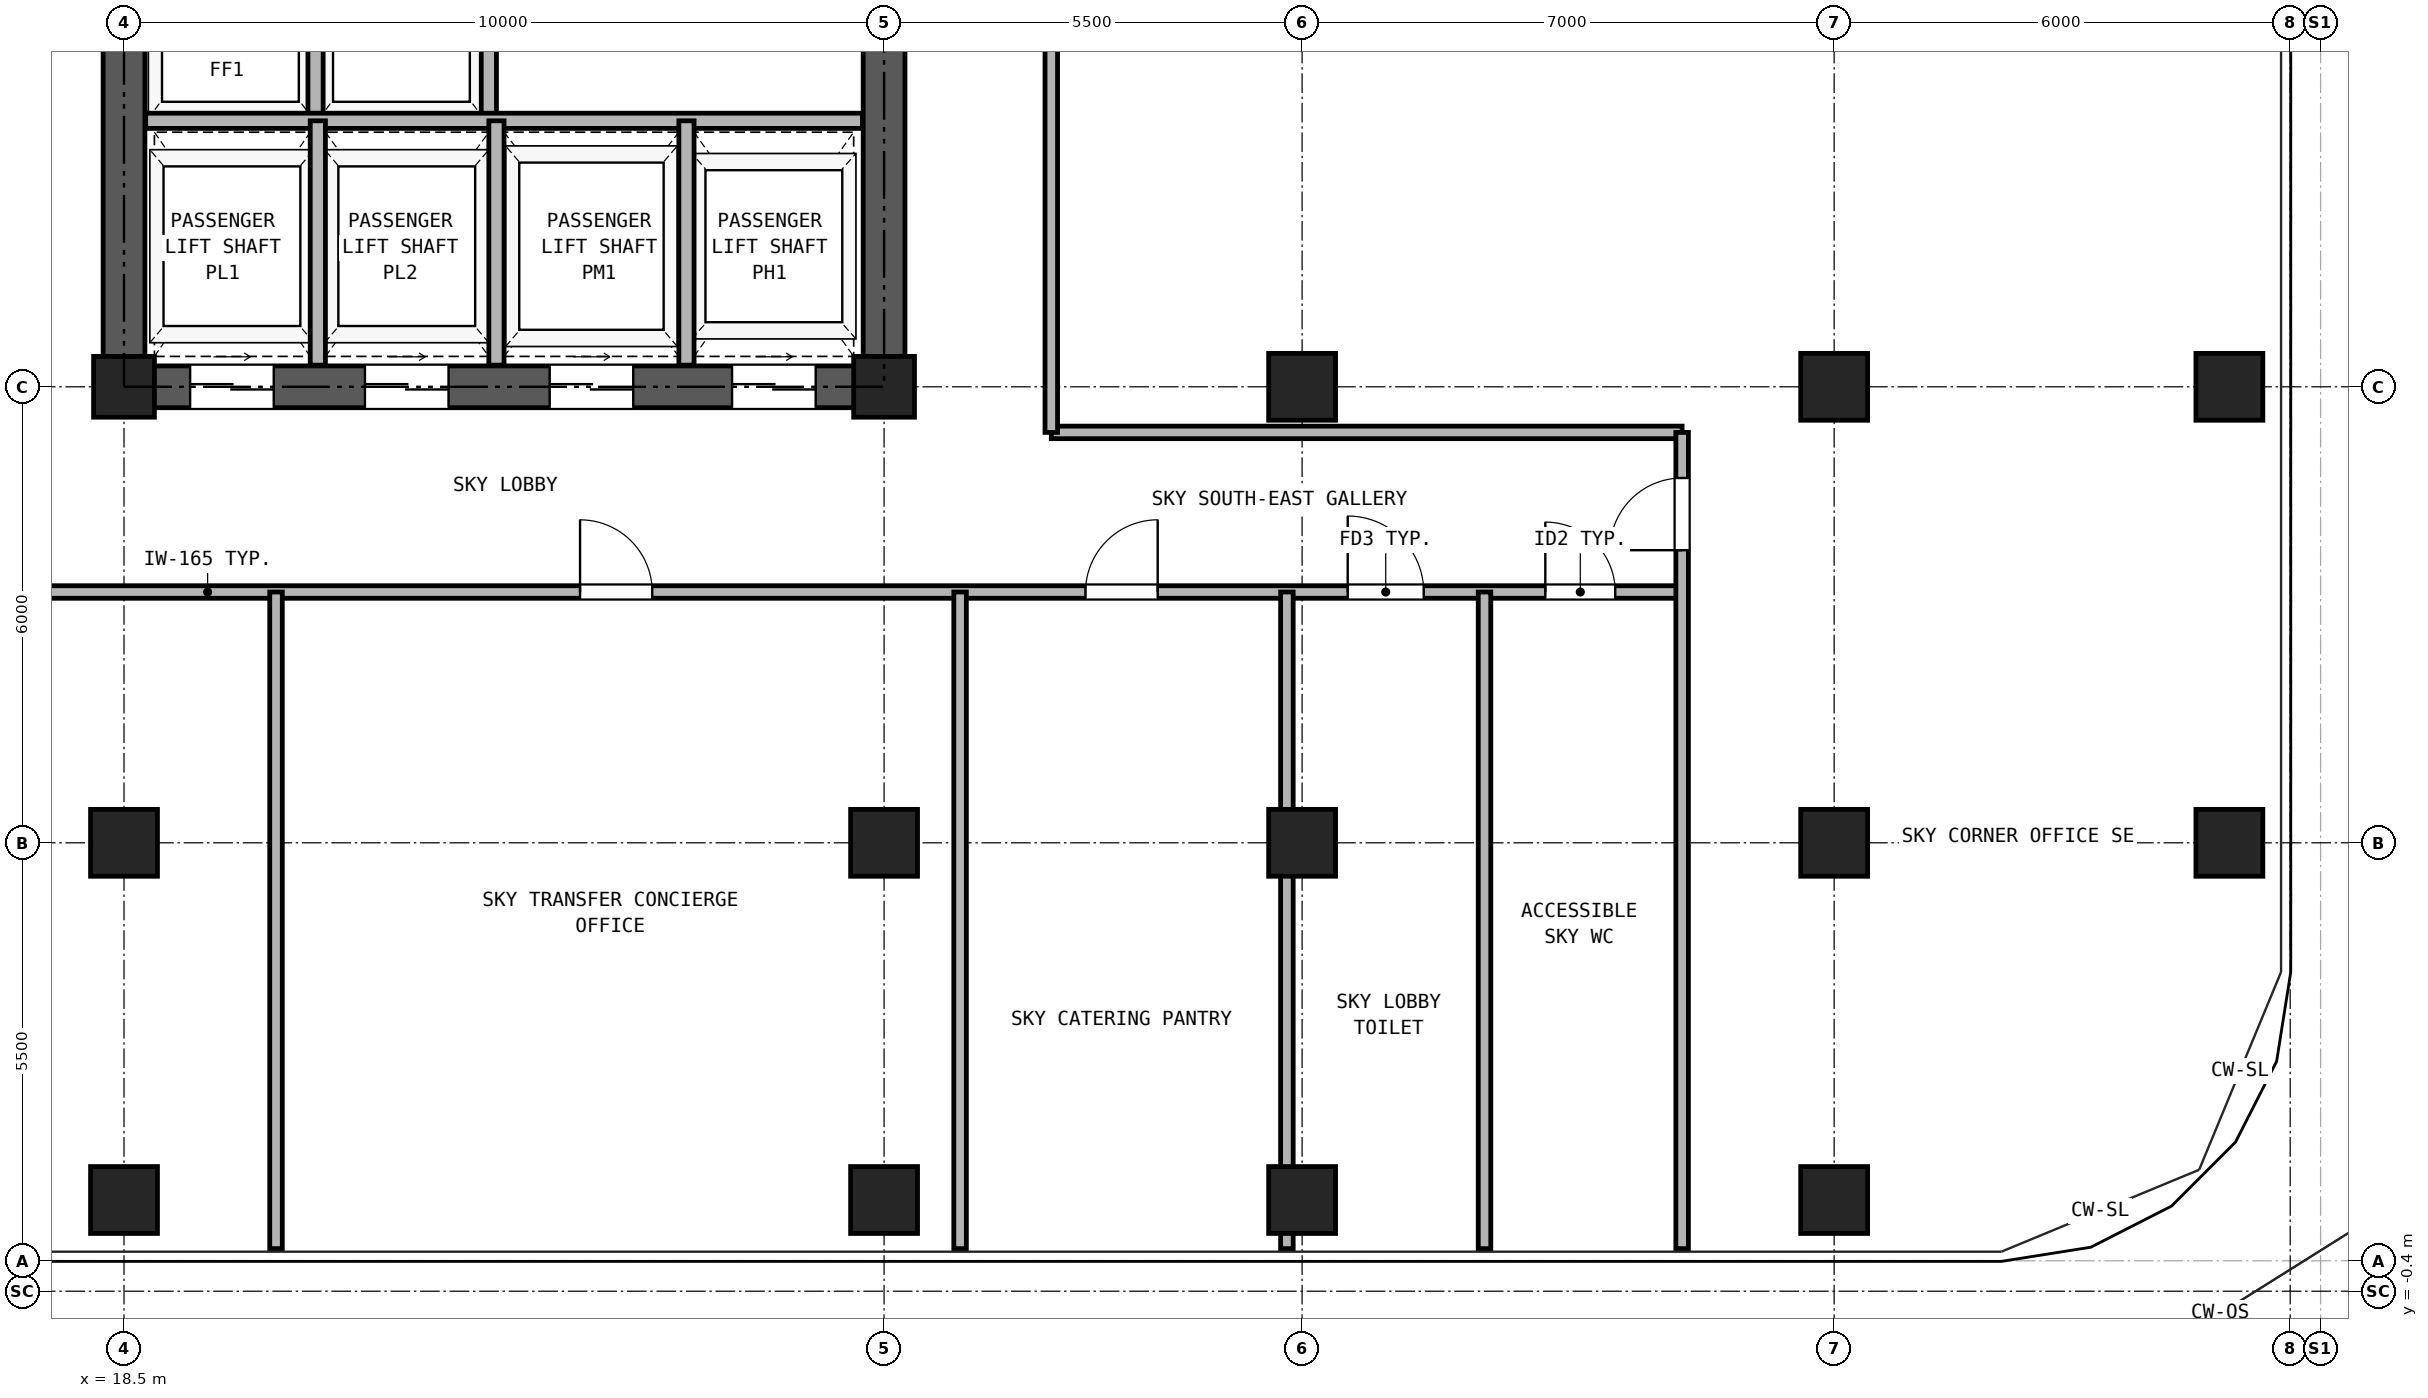
"""IFC4 building model, lengths in metres.
Left out: names, types, materials, properties, quantities, classifications, styles, units other than length and angle.
Written with IfcOpenShell. Run it as: python <this file> out.ifc"""

import sys

from ifc_helpers import new_model, si_unit, direction, frame, frame_2d, origin, origin_2d, place, context, subcontext, project, spatial, rectangle, hollow_rectangle, extrude, source, transform, mapped, element, fill, save


model = new_model("IFC4")
c1 = context("Model", 3, precision=1e-05, world=origin(), true_north=direction((0.0, 1.0)))
c2 = subcontext(c1, "Body", "Model", "MODEL_VIEW")
j1 = project(units=[si_unit("LENGTHUNIT", "METRE"), si_unit("PLANEANGLEUNIT", "RADIAN")], contexts=[c1])
p1 = place(None, origin())
s1 = spatial("IfcSite", under=j1, at=p1, CompositionType="ELEMENT")
p2 = place(p1, origin())
s2 = spatial("IfcBuilding", under=s1, at=p2, CompositionType="ELEMENT")
p3 = place(p2, frame((0.0, 0.0, 88.2)))
s3 = spatial("IfcBuildingStorey", under=s2, at=p3, CompositionType="ELEMENT", Elevation=88.2)
m1 = source(origin(), c2, "Body", "SweptSolid", [
    extrude(hollow_rectangle(XDim=0.88, YDim=0.88, WallThickness=0.05, at=origin_2d()), origin(), (0.0, 0.0, 1.0), 4.25),
])
for number, where, z_axis, x_axis in (
    (1, (18.5, 0.8, 0.0), (0.0, 0.0, 1.0), (1.0, 0.0, 0.0)),
    (2, (28.5, 0.8, 0.0), (0.0, 0.0, 1.0), (1.0, 0.0, 0.0)),
    (3, (34.0, 0.8, 0.0), (0.0, 0.0, 1.0), (1.0, 0.0, 0.0)),
    (4, (41.0, 0.8, 0.0), (0.0, 0.0, 1.0), (1.0, 0.0, 0.0)),
    (5, (46.2, 5.5, 0.0), (0.0, 0.0, 1.0), (1.0, 0.0, 0.0)),
    (6, (46.2, 11.5, 0.0), (0.0, 0.0, 1.0), (1.0, 0.0, 0.0)),
    (7, (18.5, 5.5, 0.0), (0.0, 0.0, 1.0), (1.0, 0.0, 0.0)),
):
    element("IfcColumn", number, at=place(p3, frame(where, z_axis=z_axis, x_axis=x_axis)), inside=s3, PredefinedType="COLUMN", context=c2, shape_type="MappedRepresentation", body=[
        mapped(m1, transform((0.0, 0.0, 0.0), x_axis=(1.0, 0.0, 0.0), y_axis=(0.0, 1.0, 0.0), z_axis=(0.0, 0.0, 1.0), scale=1.0)),
    ])
m2 = source(origin(), c2, "Body", "SweptSolid", [
    extrude(hollow_rectangle(XDim=0.8, YDim=0.8, WallThickness=0.045, at=origin_2d()), origin(), (0.0, 0.0, 1.0), 4.25),
])
p4 = place(p3, frame((18.5, 11.5, 0.0), z_axis=(0.0, 0.0, 1.0), x_axis=(1.0, 0.0, 0.0)))
e8 = element("IfcColumn", 8, at=p4, inside=s3, PredefinedType="COLUMN", context=c2, shape_type="MappedRepresentation", body=[
    mapped(m2, transform((0.0, 0.0, 0.0), x_axis=(1.0, 0.0, 0.0), y_axis=(0.0, 1.0, 0.0), z_axis=(0.0, 0.0, 1.0), scale=1.0)),
])
p5 = place(p3, frame((28.5, 5.5, 0.0), z_axis=(0.0, 0.0, 1.0), x_axis=(1.0, 0.0, 0.0)))
e9 = element("IfcColumn", 9, at=p5, inside=s3, PredefinedType="COLUMN", context=c2, shape_type="MappedRepresentation", body=[
    mapped(m1, transform((0.0, 0.0, 0.0), x_axis=(1.0, 0.0, 0.0), y_axis=(0.0, 1.0, 0.0), z_axis=(0.0, 0.0, 1.0), scale=1.0)),
])
p6 = place(p3, frame((28.5, 11.5, 0.0), z_axis=(0.0, 0.0, 1.0), x_axis=(1.0, 0.0, 0.0)))
e10 = element("IfcColumn", 10, at=p6, inside=s3, PredefinedType="COLUMN", context=c2, shape_type="MappedRepresentation", body=[
    mapped(m2, transform((0.0, 0.0, 0.0), x_axis=(1.0, 0.0, 0.0), y_axis=(0.0, 1.0, 0.0), z_axis=(0.0, 0.0, 1.0), scale=1.0)),
])
for number, where, z_axis, x_axis in (
    (11, (34.0, 5.5, 0.0), (0.0, 0.0, 1.0), (1.0, 0.0, 0.0)),
    (12, (34.0, 11.5, 0.0), (0.0, 0.0, 1.0), (1.0, 0.0, 0.0)),
    (13, (41.0, 5.5, 0.0), (0.0, 0.0, 1.0), (1.0, 0.0, 0.0)),
    (14, (41.0, 11.5, 0.0), (0.0, 0.0, 1.0), (1.0, 0.0, 0.0)),
):
    element("IfcColumn", number, at=place(p3, frame(where, z_axis=z_axis, x_axis=x_axis)), inside=s3, PredefinedType="COLUMN", context=c2, shape_type="MappedRepresentation", body=[
        mapped(m1, transform((0.0, 0.0, 0.0), x_axis=(1.0, 0.0, 0.0), y_axis=(0.0, 1.0, 0.0), z_axis=(0.0, 0.0, 1.0), scale=1.0)),
    ])
p7 = place(p3, frame((18.225, 11.5, 0.0), z_axis=(0.0, 0.0, 1.0), x_axis=(1.0, 0.0, 0.0)))
e15 = element("IfcWall", 15, at=p7, inside=s3, PredefinedType="SHEAR", context=c2, shape_type="SweptSolid", body=[
    extrude(rectangle(XDim=10.55, YDim=0.55, at=frame_2d((5.275, 0.0))), origin(), (0.0, 0.0, 1.0), 4.25),
])
p8 = place(p7, frame((1.145, 0.0, 0.0)))
e16 = element("IfcOpeningElement", 16, at=p8, cuts=e15, PredefinedType="OPENING", context=c2, shape_type="SweptSolid", body=[
    extrude(rectangle(XDim=1.1, YDim=2.25, at=frame_2d((0.55, 1.125))), frame((0.0, 0.285, 0.0), z_axis=(0.0, -1.0, 0.0), x_axis=(1.0, 0.0, 0.0)), (0.0, 0.0, 1.0), 0.57),
])
p9 = place(p7, frame((3.445, 0.0, 0.0)))
e17 = element("IfcOpeningElement", 17, at=p9, cuts=e15, PredefinedType="OPENING", context=c2, shape_type="SweptSolid", body=[
    extrude(rectangle(XDim=1.1, YDim=2.25, at=frame_2d((0.55, 1.125))), frame((0.0, 0.285, 0.0), z_axis=(0.0, -1.0, 0.0), x_axis=(1.0, 0.0, 0.0)), (0.0, 0.0, 1.0), 0.57),
])
p10 = place(p7, frame((5.875, 0.0, 0.0)))
e18 = element("IfcOpeningElement", 18, at=p10, cuts=e15, PredefinedType="OPENING", context=c2, shape_type="SweptSolid", body=[
    extrude(rectangle(XDim=1.1, YDim=2.25, at=frame_2d((0.55, 1.125))), frame((0.0, 0.285, 0.0), z_axis=(0.0, -1.0, 0.0), x_axis=(1.0, 0.0, 0.0)), (0.0, 0.0, 1.0), 0.57),
])
p11 = place(p7, frame((8.275, 0.0, 0.0)))
e19 = element("IfcOpeningElement", 19, at=p11, cuts=e15, PredefinedType="OPENING", context=c2, shape_type="SweptSolid", body=[
    extrude(rectangle(XDim=1.1, YDim=2.25, at=frame_2d((0.55, 1.125))), frame((0.0, 0.285, 0.0), z_axis=(0.0, -1.0, 0.0), x_axis=(1.0, 0.0, 0.0)), (0.0, 0.0, 1.0), 0.57),
])
p12 = place(p3, frame((18.5, 11.775, 0.0), z_axis=(0.0, 0.0, 1.0), x_axis=(0.0, 1.0, 0.0)))
e20 = element("IfcWall", 20, at=p12, inside=s3, PredefinedType="SHEAR", context=c2, shape_type="SweptSolid", body=[
    extrude(rectangle(XDim=16.7, YDim=0.55, at=frame_2d((8.35, 0.0))), origin(), (0.0, 0.0, 1.0), 4.25),
])
p13 = place(p12, frame((7.375, 0.0, 0.0)))
e21 = element("IfcOpeningElement", 21, at=p13, cuts=e20, PredefinedType="OPENING", context=c2, shape_type="SweptSolid", body=[
    extrude(rectangle(XDim=1.15, YDim=2.2, at=frame_2d((0.575, 1.1))), frame((0.0, 0.285, 0.0), z_axis=(0.0, -1.0, 0.0), x_axis=(1.0, 0.0, 0.0)), (0.0, 0.0, 1.0), 0.57),
])
p14 = place(p3, frame((28.5, 11.775, 0.0), z_axis=(0.0, 0.0, 1.0), x_axis=(0.0, 1.0, 0.0)))
e22 = element("IfcWall", 22, at=p14, inside=s3, PredefinedType="SHEAR", context=c2, shape_type="SweptSolid", body=[
    extrude(rectangle(XDim=16.7, YDim=0.55, at=frame_2d((8.35, 0.0))), origin(), (0.0, 0.0, 1.0), 4.25),
])
p15 = place(p14, frame((7.375, 0.0, 0.0)))
e23 = element("IfcOpeningElement", 23, at=p15, cuts=e22, PredefinedType="OPENING", context=c2, shape_type="SweptSolid", body=[
    extrude(rectangle(XDim=1.15, YDim=2.2, at=frame_2d((0.575, 1.1))), frame((0.0, 0.285, 0.0), z_axis=(0.0, -1.0, 0.0), x_axis=(1.0, 0.0, 0.0)), (0.0, 0.0, 1.0), 0.57),
])
for number, where, z_axis, x_axis in (
    (24, (21.02, 15.0, 0.0), (0.0, 0.0, 1.0), (0.0, 1.0, 0.0)),
    (25, (23.3, 15.0, 0.0), (0.0, 0.0, 1.0), (0.0, 1.0, 0.0)),
):
    element("IfcWall", number, at=place(p3, frame(where, z_axis=z_axis, x_axis=x_axis)), inside=s3, PredefinedType="PARTITIONING", context=c2, shape_type="SweptSolid", body=[
        extrude(rectangle(XDim=3.0, YDim=0.2, at=frame_2d((1.5, 0.0))), origin(), (0.0, 0.0, 1.0), 4.25),
    ])
p16 = place(p3, frame((18.785, 15.0, 0.0), z_axis=(0.0, 0.0, 1.0), x_axis=(1.0, 0.0, 0.0)))
e26 = element("IfcWall", 26, at=p16, inside=s3, PredefinedType="PARTITIONING", context=c2, shape_type="SweptSolid", body=[
    extrude(rectangle(XDim=9.43, YDim=0.2, at=frame_2d((4.715, 0.0))), origin(), (0.0, 0.0, 1.0), 4.25),
])
for number, where, z_axis, x_axis in (
    (27, (21.05, 11.785, 0.0), (0.0, 0.0, 1.0), (0.0, 1.0, 0.0)),
    (28, (23.4, 11.785, 0.0), (0.0, 0.0, 1.0), (0.0, 1.0, 0.0)),
    (29, (25.9, 11.785, 0.0), (0.0, 0.0, 1.0), (0.0, 1.0, 0.0)),
):
    element("IfcWall", number, at=place(p3, frame(where, z_axis=z_axis, x_axis=x_axis)), inside=s3, PredefinedType="PARTITIONING", context=c2, shape_type="SweptSolid", body=[
        extrude(rectangle(XDim=3.215, YDim=0.2, at=frame_2d((1.607, 0.0))), origin(), (0.0, 0.0, 1.0), 4.25),
    ])
p17 = place(p3, frame((8.0, 8.8, 0.0), z_axis=(0.0, 0.0, 1.0), x_axis=(1.0, 0.0, 0.0)))
e30 = element("IfcWall", 30, at=p17, inside=s3, PredefinedType="PARTITIONING", context=c2, shape_type="SweptSolid", body=[
    extrude(rectangle(XDim=31.0, YDim=0.165, at=frame_2d((15.5, 0.0))), origin(), (0.0, 0.0, 1.0), 4.25),
])
p18 = place(p17, frame((5.75, 0.0, 0.0)))
e31 = element("IfcOpeningElement", 31, at=p18, cuts=e30, PredefinedType="OPENING", context=c2, shape_type="SweptSolid", body=[
    extrude(rectangle(XDim=0.95, YDim=2.15, at=frame_2d((0.475, 1.075))), frame((0.0, 0.093, 0.0), z_axis=(0.0, -1.0, 0.0), x_axis=(1.0, 0.0, 0.0)), (0.0, 0.0, 1.0), 0.185),
])
p19 = place(p17, frame((16.5, 0.0, 0.0)))
e32 = element("IfcOpeningElement", 32, at=p19, cuts=e30, PredefinedType="OPENING", context=c2, shape_type="SweptSolid", body=[
    extrude(rectangle(XDim=0.95, YDim=2.15, at=frame_2d((0.475, 1.075))), frame((0.0, 0.093, 0.0), z_axis=(0.0, -1.0, 0.0), x_axis=(1.0, 0.0, 0.0)), (0.0, 0.0, 1.0), 0.185),
])
p20 = place(p17, frame((23.15, 0.0, 0.0)))
e33 = element("IfcOpeningElement", 33, at=p20, cuts=e30, PredefinedType="OPENING", context=c2, shape_type="SweptSolid", body=[
    extrude(rectangle(XDim=0.95, YDim=2.15, at=frame_2d((0.475, 1.075))), frame((0.0, 0.093, 0.0), z_axis=(0.0, -1.0, 0.0), x_axis=(1.0, 0.0, 0.0)), (0.0, 0.0, 1.0), 0.185),
])
p21 = place(p17, frame((26.6, 0.0, 0.0)))
e34 = element("IfcOpeningElement", 34, at=p21, cuts=e30, PredefinedType="OPENING", context=c2, shape_type="SweptSolid", body=[
    extrude(rectangle(XDim=1.0, YDim=2.15, at=frame_2d((0.5, 1.075))), frame((0.0, 0.093, 0.0), z_axis=(0.0, -1.0, 0.0), x_axis=(1.0, 0.0, 0.0)), (0.0, 0.0, 1.0), 0.185),
])
p22 = place(p17, frame((29.2, 0.0, 0.0)))
e35 = element("IfcOpeningElement", 35, at=p22, cuts=e30, PredefinedType="OPENING", context=c2, shape_type="SweptSolid", body=[
    extrude(rectangle(XDim=0.92, YDim=2.1, at=frame_2d((0.46, 1.05))), frame((0.0, 0.093, 0.0), z_axis=(0.0, -1.0, 0.0), x_axis=(1.0, 0.0, 0.0)), (0.0, 0.0, 1.0), 0.185),
])
p23 = place(p3, frame((30.7, 10.9, 0.0), z_axis=(0.0, 0.0, 1.0), x_axis=(1.0, 0.0, 0.0)))
e36 = element("IfcWall", 36, at=p23, inside=s3, PredefinedType="PARTITIONING", context=c2, shape_type="SweptSolid", body=[
    extrude(rectangle(XDim=8.3, YDim=0.165, at=frame_2d((4.15, 0.0))), origin(), (0.0, 0.0, 1.0), 4.25),
])
p24 = place(p3, frame((30.7, 10.9, 0.0), z_axis=(0.0, 0.0, 1.0), x_axis=(0.0, 1.0, 0.0)))
e37 = element("IfcWall", 37, at=p24, inside=s3, PredefinedType="PARTITIONING", context=c2, shape_type="SweptSolid", body=[
    extrude(rectangle(XDim=18.35, YDim=0.165, at=frame_2d((9.175, 0.0))), origin(), (0.0, 0.0, 1.0), 4.25),
])
p25 = place(p24, frame((8.675, 0.0, 0.0)))
e38 = element("IfcOpeningElement", 38, at=p25, cuts=e37, PredefinedType="OPENING", context=c2, shape_type="SweptSolid", body=[
    extrude(rectangle(XDim=0.95, YDim=2.15, at=frame_2d((0.475, 1.075))), frame((0.0, 0.093, 0.0), z_axis=(0.0, -1.0, 0.0), x_axis=(1.0, 0.0, 0.0)), (0.0, 0.0, 1.0), 0.185),
])
p26 = place(p3, frame((39.0, 0.16, 0.0), z_axis=(0.0, 0.0, 1.0), x_axis=(0.0, 1.0, 0.0)))
e39 = element("IfcWall", 39, at=p26, inside=s3, PredefinedType="PARTITIONING", context=c2, shape_type="SweptSolid", body=[
    extrude(rectangle(XDim=10.74, YDim=0.165, at=frame_2d((5.37, 0.0))), origin(), (0.0, 0.0, 1.0), 4.25),
])
p27 = place(p26, frame((9.19, 0.0, 0.0)))
e40 = element("IfcOpeningElement", 40, at=p27, cuts=e39, PredefinedType="OPENING", context=c2, shape_type="SweptSolid", body=[
    extrude(rectangle(XDim=0.95, YDim=2.15, at=frame_2d((0.475, 1.075))), frame((0.0, 0.093, 0.0), z_axis=(0.0, -1.0, 0.0), x_axis=(1.0, 0.0, 0.0)), (0.0, 0.0, 1.0), 0.185),
])
for number, where, z_axis, x_axis in (
    (41, (20.5, 0.16, 0.0), (0.0, 0.0, 1.0), (0.0, 1.0, 0.0)),
    (42, (29.5, 0.16, 0.0), (0.0, 0.0, 1.0), (0.0, 1.0, 0.0)),
):
    element("IfcWall", number, at=place(p3, frame(where, z_axis=z_axis, x_axis=x_axis)), inside=s3, PredefinedType="PARTITIONING", context=c2, shape_type="SweptSolid", body=[
        extrude(rectangle(XDim=8.64, YDim=0.165, at=frame_2d((4.32, 0.0))), origin(), (0.0, 0.0, 1.0), 4.25),
    ])
p28 = place(p3, frame((33.8, 0.16, 0.0), z_axis=(0.0, 0.0, 1.0), x_axis=(0.0, 1.0, 0.0)))
e43 = element("IfcWall", 43, at=p28, inside=s3, PredefinedType="PARTITIONING", context=c2, shape_type="SweptSolid", body=[
    extrude(rectangle(XDim=8.64, YDim=0.165, at=frame_2d((4.32, 0.0))), origin(), (0.0, 0.0, 1.0), 3.547),
])
p29 = place(p3, frame((36.4, 0.16, 0.0), z_axis=(0.0, 0.0, 1.0), x_axis=(0.0, 1.0, 0.0)))
e44 = element("IfcWall", 44, at=p29, inside=s3, PredefinedType="PARTITIONING", context=c2, shape_type="SweptSolid", body=[
    extrude(rectangle(XDim=8.64, YDim=0.165, at=frame_2d((4.32, 0.0))), origin(), (0.0, 0.0, 1.0), 4.25),
])
p30 = place(p8, frame((1.1, 0.0, 0.0), z_axis=(0.0, 0.0, 1.0), x_axis=(-1.0, 0.0, 0.0)))
e45 = element("IfcDoor", 45, at=p30, inside=s3, OperationType="DOUBLE_DOOR_SLIDING", PredefinedType="DOOR", context=c2, shape_type="SweptSolid", body=[
    extrude(rectangle(XDim=1.1, YDim=2.25, at=frame_2d((0.55, 1.125))), frame((0.0, 0.025, 0.0), z_axis=(0.0, -1.0, 0.0), x_axis=(1.0, 0.0, 0.0)), (0.0, 0.0, 1.0), 0.05),
])
fill(e16, e45)
p31 = place(p9, frame((1.1, 0.0, 0.0), z_axis=(0.0, 0.0, 1.0), x_axis=(-1.0, 0.0, 0.0)))
e46 = element("IfcDoor", 46, at=p31, inside=s3, OperationType="DOUBLE_DOOR_SLIDING", PredefinedType="DOOR", context=c2, shape_type="SweptSolid", body=[
    extrude(rectangle(XDim=1.1, YDim=2.25, at=frame_2d((0.55, 1.125))), frame((0.0, 0.025, 0.0), z_axis=(0.0, -1.0, 0.0), x_axis=(1.0, 0.0, 0.0)), (0.0, 0.0, 1.0), 0.05),
])
fill(e17, e46)
p32 = place(p10, frame((1.1, 0.0, 0.0), z_axis=(0.0, 0.0, 1.0), x_axis=(-1.0, 0.0, 0.0)))
e47 = element("IfcDoor", 47, at=p32, inside=s3, OperationType="DOUBLE_DOOR_SLIDING", PredefinedType="DOOR", context=c2, shape_type="SweptSolid", body=[
    extrude(rectangle(XDim=1.1, YDim=2.25, at=frame_2d((0.55, 1.125))), frame((0.0, 0.025, 0.0), z_axis=(0.0, -1.0, 0.0), x_axis=(1.0, 0.0, 0.0)), (0.0, 0.0, 1.0), 0.05),
])
fill(e18, e47)
p33 = place(p11, frame((1.1, 0.0, 0.0), z_axis=(0.0, 0.0, 1.0), x_axis=(-1.0, 0.0, 0.0)))
e48 = element("IfcDoor", 48, at=p33, inside=s3, OperationType="DOUBLE_DOOR_SLIDING", PredefinedType="DOOR", context=c2, shape_type="SweptSolid", body=[
    extrude(rectangle(XDim=1.1, YDim=2.25, at=frame_2d((0.55, 1.125))), frame((0.0, 0.025, 0.0), z_axis=(0.0, -1.0, 0.0), x_axis=(1.0, 0.0, 0.0)), (0.0, 0.0, 1.0), 0.05),
])
fill(e19, e48)
p34 = place(p19, frame((0.95, 0.0, 0.0), z_axis=(0.0, 0.0, 1.0), x_axis=(-1.0, 0.0, 0.0)))
e49 = element("IfcDoor", 49, at=p34, inside=s3, OperationType="SINGLE_SWING_LEFT", PredefinedType="DOOR", context=c2, shape_type="SweptSolid", body=[
    extrude(rectangle(XDim=0.95, YDim=2.15, at=frame_2d((0.475, 1.075))), frame((0.0, 0.025, 0.0), z_axis=(0.0, -1.0, 0.0), x_axis=(1.0, 0.0, 0.0)), (0.0, 0.0, 1.0), 0.05),
])
fill(e32, e49)
p35 = place(p20, frame((0.95, 0.0, 0.0), z_axis=(0.0, 0.0, 1.0), x_axis=(-1.0, 0.0, 0.0)))
e50 = element("IfcDoor", 50, at=p35, inside=s3, OperationType="SINGLE_SWING_RIGHT", PredefinedType="DOOR", context=c2, shape_type="SweptSolid", body=[
    extrude(rectangle(XDim=0.95, YDim=2.15, at=frame_2d((0.475, 1.075))), frame((0.0, 0.025, 0.0), z_axis=(0.0, -1.0, 0.0), x_axis=(1.0, 0.0, 0.0)), (0.0, 0.0, 1.0), 0.05),
])
fill(e33, e50)
p36 = place(p21, frame((1.0, 0.0, 0.0), z_axis=(0.0, 0.0, 1.0), x_axis=(-1.0, 0.0, 0.0)))
e51 = element("IfcDoor", 51, at=p36, inside=s3, OperationType="SINGLE_SWING_LEFT", PredefinedType="DOOR", context=c2, shape_type="SweptSolid", body=[
    extrude(rectangle(XDim=1.0, YDim=2.15, at=frame_2d((0.5, 1.075))), frame((0.0, 0.025, 0.0), z_axis=(0.0, -1.0, 0.0), x_axis=(1.0, 0.0, 0.0)), (0.0, 0.0, 1.0), 0.05),
])
fill(e34, e51)
p37 = place(p22, frame((0.92, 0.0, 0.0), z_axis=(0.0, 0.0, 1.0), x_axis=(-1.0, 0.0, 0.0)))
e52 = element("IfcDoor", 52, at=p37, inside=s3, OperationType="SINGLE_SWING_LEFT", PredefinedType="DOOR", context=c2, shape_type="SweptSolid", body=[
    extrude(rectangle(XDim=0.92, YDim=2.1, at=frame_2d((0.46, 1.05))), frame((0.0, 0.025, 0.0), z_axis=(0.0, -1.0, 0.0), x_axis=(1.0, 0.0, 0.0)), (0.0, 0.0, 1.0), 0.05),
])
fill(e35, e52)
p38 = place(p27, origin())
e53 = element("IfcDoor", 53, at=p38, inside=s3, OperationType="SINGLE_SWING_LEFT", PredefinedType="DOOR", context=c2, shape_type="SweptSolid", body=[
    extrude(rectangle(XDim=0.95, YDim=2.15, at=frame_2d((0.475, 1.075))), frame((0.0, 0.025, 0.0), z_axis=(0.0, -1.0, 0.0), x_axis=(1.0, 0.0, 0.0)), (0.0, 0.0, 1.0), 0.05),
])
fill(e40, e53)
save(model, sys.argv[1])
